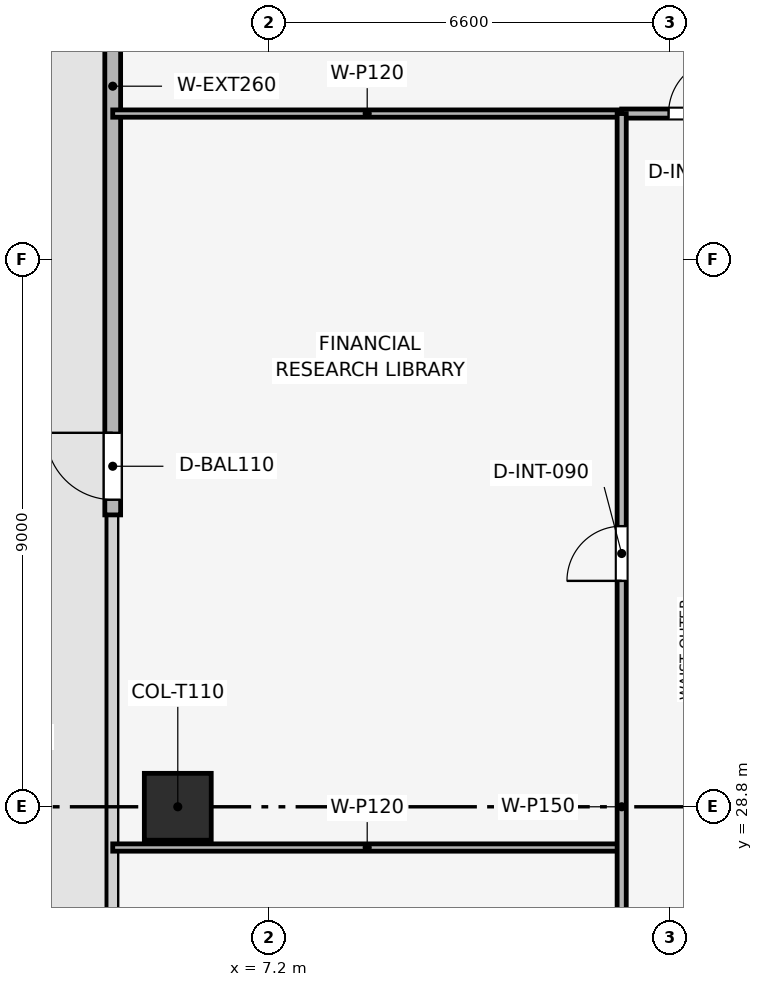
"""IFC4 building model, lengths in metres.
Left out: names, types, materials, properties, quantities, classifications, styles, units other than length and angle.
Written with IfcOpenShell. Run it as: python <this file> out.ifc"""

import sys

from ifc_helpers import new_model, si_unit, direction, frame, frame_2d, origin, origin_2d, place, context, subcontext, project, spatial, rectangle, extrude, element, fill, save


model = new_model("IFC4")
c1 = context("Model", 3, precision=1e-05, world=origin(), true_north=direction((0.0, 1.0)))
c2 = subcontext(c1, "Body", "Model", "MODEL_VIEW")
j1 = project(units=[si_unit("LENGTHUNIT", "METRE"), si_unit("PLANEANGLEUNIT", "RADIAN")], contexts=[c1])
p1 = place(None, origin())
s1 = spatial("IfcSite", under=j1, at=p1, CompositionType="ELEMENT")
p2 = place(p1, origin())
s2 = spatial("IfcBuilding", under=s1, at=p2, CompositionType="ELEMENT")
p3 = place(p2, frame((0.0, 0.0, 183.3)))
s3 = spatial("IfcBuildingStorey", under=s2, at=p3, CompositionType="ELEMENT", Elevation=183.3)
p4 = place(p3, frame((5.7, 28.8, 0.003), z_axis=(0.0, 0.0, 1.0), x_axis=(1.0, 0.0, 0.0)))
e1 = element("IfcColumn", 1, at=p4, inside=s3, PredefinedType="COLUMN", context=c2, shape_type="SweptSolid", body=[
    extrude(rectangle(XDim=1.1, YDim=1.1, at=origin_2d()), origin(), (0.0, 0.0, 1.0), 3.489),
])
p5 = place(p3, frame((4.63, 33.6, 0.0), z_axis=(0.0, 0.0, 1.0), x_axis=(0.0, 1.0, 0.0)))
e2 = element("IfcWall", 2, at=p5, inside=s3, PredefinedType="SOLIDWALL", context=c2, shape_type="SweptSolid", body=[
    extrude(rectangle(XDim=12.6, YDim=0.26, at=frame_2d((6.3, 0.0))), origin(), (0.0, 0.0, 1.0), 3.495),
])
p6 = place(p5, frame((0.25, 0.0, 0.0)))
e3 = element("IfcOpeningElement", 3, at=p6, cuts=e2, PredefinedType="OPENING", context=c2, shape_type="SweptSolid", body=[
    extrude(rectangle(XDim=1.1, YDim=2.2, at=frame_2d((0.55, 1.1))), frame((0.0, 0.14, 0.0), z_axis=(0.0, -1.0, 0.0), x_axis=(1.0, 0.0, 0.0)), (0.0, 0.0, 1.0), 0.28),
])
for number, where, z_axis, x_axis in (
    (4, (4.63, 28.13, 0.0), (0.0, 0.0, 1.0), (1.0, 0.0, 0.0)),
    (5, (4.63, 40.2, 0.0), (0.0, 0.0, 1.0), (1.0, 0.0, 0.0)),
):
    element("IfcWall", number, at=place(p3, frame(where, z_axis=z_axis, x_axis=x_axis)), inside=s3, PredefinedType="PARTITIONING", context=c2, shape_type="SweptSolid", body=[
        extrude(rectangle(XDim=8.37, YDim=0.12, at=frame_2d((4.185, 0.0))), origin(), (0.0, 0.0, 1.0), 2.98),
    ])
p7 = place(p3, frame((13.0, 40.2, 0.0), z_axis=(0.0, 0.0, 1.0), x_axis=(1.0, 0.0, 0.0)))
e6 = element("IfcWall", 6, at=p7, inside=s3, PredefinedType="PARTITIONING", context=c2, shape_type="SweptSolid", body=[
    extrude(rectangle(XDim=31.6, YDim=0.15, at=frame_2d((15.8, 0.0))), origin(), (0.0, 0.0, 1.0), 3.03),
])
p8 = place(p7, frame((0.771, 0.0, 0.0)))
e7 = element("IfcOpeningElement", 7, at=p8, cuts=e6, PredefinedType="OPENING", context=c2, shape_type="SweptSolid", body=[
    extrude(rectangle(XDim=0.9, YDim=2.1, at=frame_2d((0.45, 1.05))), frame((0.0, 0.085, 0.0), z_axis=(0.0, -1.0, 0.0), x_axis=(1.0, 0.0, 0.0)), (0.0, 0.0, 1.0), 0.17),
])
p9 = place(p7, frame((6.409, 0.0, 0.0)))
e8 = element("IfcOpeningElement", 8, at=p9, cuts=e6, PredefinedType="OPENING", context=c2, shape_type="SweptSolid", body=[
    extrude(rectangle(XDim=0.9, YDim=2.1, at=frame_2d((0.45, 1.05))), frame((0.0, 0.085, 0.0), z_axis=(0.0, -1.0, 0.0), x_axis=(1.0, 0.0, 0.0)), (0.0, 0.0, 1.0), 0.17),
])
p10 = place(p7, frame((15.239, 0.0, 0.0)))
e9 = element("IfcOpeningElement", 9, at=p10, cuts=e6, PredefinedType="OPENING", context=c2, shape_type="SweptSolid", body=[
    extrude(rectangle(XDim=0.9, YDim=2.1, at=frame_2d((0.45, 1.05))), frame((0.0, 0.085, 0.0), z_axis=(0.0, -1.0, 0.0), x_axis=(1.0, 0.0, 0.0)), (0.0, 0.0, 1.0), 0.17),
])
p11 = place(p7, frame((25.402, 0.0, 0.0)))
e10 = element("IfcOpeningElement", 10, at=p11, cuts=e6, PredefinedType="OPENING", context=c2, shape_type="SweptSolid", body=[
    extrude(rectangle(XDim=0.9, YDim=2.1, at=frame_2d((0.45, 1.05))), frame((0.0, 0.085, 0.0), z_axis=(0.0, -1.0, 0.0), x_axis=(1.0, 0.0, 0.0)), (0.0, 0.0, 1.0), 0.17),
])
p12 = place(p3, frame((13.0, 17.4, 0.0), z_axis=(0.0, 0.0, 1.0), x_axis=(0.0, 1.0, 0.0)))
e11 = element("IfcWall", 11, at=p12, inside=s3, PredefinedType="PARTITIONING", context=c2, shape_type="SweptSolid", body=[
    extrude(rectangle(XDim=22.8, YDim=0.15, at=frame_2d((11.4, 0.0))), origin(), (0.0, 0.0, 1.0), 3.03),
])
p13 = place(p12, frame((6.115, 0.0, 0.0)))
e12 = element("IfcOpeningElement", 12, at=p13, cuts=e11, PredefinedType="OPENING", context=c2, shape_type="SweptSolid", body=[
    extrude(rectangle(XDim=0.9, YDim=2.1, at=frame_2d((0.45, 1.05))), frame((0.0, 0.085, 0.0), z_axis=(0.0, -1.0, 0.0), x_axis=(1.0, 0.0, 0.0)), (0.0, 0.0, 1.0), 0.17),
])
p14 = place(p12, frame((15.115, 0.0, 0.0)))
e13 = element("IfcOpeningElement", 13, at=p14, cuts=e11, PredefinedType="OPENING", context=c2, shape_type="SweptSolid", body=[
    extrude(rectangle(XDim=0.9, YDim=2.1, at=frame_2d((0.45, 1.05))), frame((0.0, 0.085, 0.0), z_axis=(0.0, -1.0, 0.0), x_axis=(1.0, 0.0, 0.0)), (0.0, 0.0, 1.0), 0.17),
])
p15 = place(p6, origin())
e14 = element("IfcDoor", 14, at=p15, inside=s3, OperationType="SINGLE_SWING_RIGHT", PredefinedType="DOOR", context=c2, shape_type="SweptSolid", body=[
    extrude(rectangle(XDim=1.1, YDim=2.2, at=frame_2d((0.55, 1.1))), frame((0.0, 0.025, 0.0), z_axis=(0.0, -1.0, 0.0), x_axis=(1.0, 0.0, 0.0)), (0.0, 0.0, 1.0), 0.05),
])
fill(e3, e14)
p16 = place(p8, origin())
e15 = element("IfcDoor", 15, at=p16, inside=s3, OperationType="SINGLE_SWING_RIGHT", PredefinedType="DOOR", context=c2, shape_type="SweptSolid", body=[
    extrude(rectangle(XDim=0.9, YDim=2.1, at=frame_2d((0.45, 1.05))), frame((0.0, 0.025, 0.0), z_axis=(0.0, -1.0, 0.0), x_axis=(1.0, 0.0, 0.0)), (0.0, 0.0, 1.0), 0.05),
])
fill(e7, e15)
p17 = place(p14, origin())
e16 = element("IfcDoor", 16, at=p17, inside=s3, OperationType="SINGLE_SWING_LEFT", PredefinedType="DOOR", context=c2, shape_type="SweptSolid", body=[
    extrude(rectangle(XDim=0.9, YDim=2.1, at=frame_2d((0.45, 1.05))), frame((0.0, 0.025, 0.0), z_axis=(0.0, -1.0, 0.0), x_axis=(1.0, 0.0, 0.0)), (0.0, 0.0, 1.0), 0.05),
])
fill(e13, e16)
save(model, sys.argv[1])
